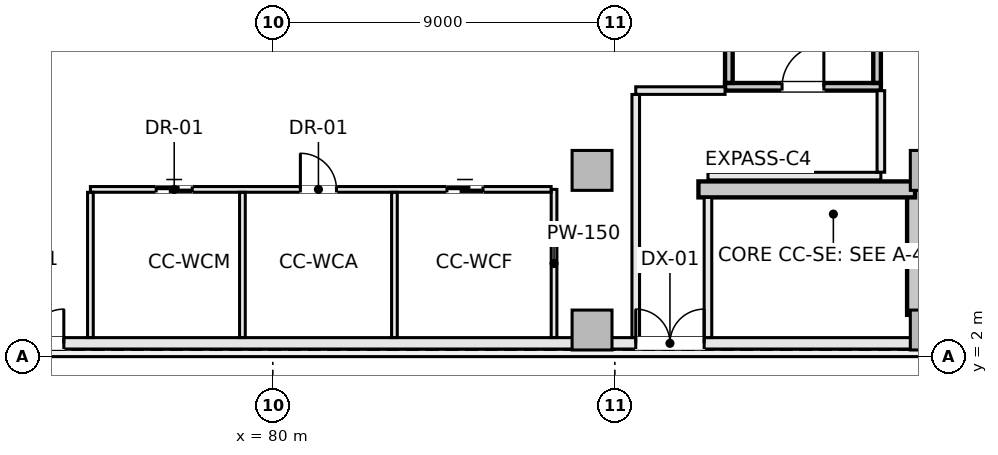
"""IFC4 building model, lengths in metres.
Left out: names, types, materials, properties, quantities, classifications, styles, units other than length and angle.
Written with IfcOpenShell. Run it as: python <this file> out.ifc"""

import sys

from ifc_helpers import new_model, si_unit, direction, frame, frame_2d, origin, origin_2d, place, context, subcontext, project, spatial, rectangle, extrude, element, fill, save


model = new_model("IFC4")
c1 = context("Model", 3, precision=1e-05, world=origin(), true_north=direction((0.0, 1.0)))
c2 = subcontext(c1, "Body", "Model", "MODEL_VIEW")
j1 = project(units=[si_unit("LENGTHUNIT", "METRE"), si_unit("PLANEANGLEUNIT", "RADIAN")], contexts=[c1])
p1 = place(None, origin())
s1 = spatial("IfcSite", under=j1, at=p1, CompositionType="ELEMENT")
p2 = place(p1, origin())
s2 = spatial("IfcBuilding", under=s1, at=p2, CompositionType="ELEMENT")
p3 = place(p2, origin())
s3 = spatial("IfcBuildingStorey", under=s2, at=p3, CompositionType="ELEMENT", Elevation=0.0)
p4 = place(p3, frame((96.9, 3.1, -0.36), z_axis=(0.0, 0.0, 1.0), x_axis=(0.0, 1.0, 0.0)))
e1 = element("IfcWall", 1, at=p4, inside=s3, PredefinedType="SHEAR", context=c2, shape_type="SweptSolid", body=[
    extrude(rectangle(XDim=3.3, YDim=0.42, at=frame_2d((1.65, 0.0))), origin(), (0.0, 0.0, 1.0), 5.1),
])
p5 = place(p3, frame((91.2, 6.4, -0.36), z_axis=(0.0, 0.0, 1.0), x_axis=(1.0, 0.0, 0.0)))
e2 = element("IfcWall", 2, at=p5, inside=s3, PredefinedType="SHEAR", context=c2, shape_type="SweptSolid", body=[
    extrude(rectangle(XDim=5.7, YDim=0.42, at=frame_2d((2.85, 0.0))), origin(), (0.0, 0.0, 1.0), 5.1),
])
for number, where, z_axis, x_axis in (
    (3, (88.4, 2.7, -0.36), (0.0, 0.0, 1.0), (1.0, 0.0, 0.0)),
    (4, (88.4, 6.9, -0.36), (0.0, 0.0, 1.0), (1.0, 0.0, 0.0)),
    (5, (97.3, 2.7, -0.36), (0.0, 0.0, 1.0), (1.0, 0.0, 0.0)),
    (6, (97.3, 6.9, -0.36), (0.0, 0.0, 1.0), (1.0, 0.0, 0.0)),
):
    element("IfcColumn", number, at=place(p3, frame(where, z_axis=z_axis, x_axis=x_axis)), inside=s3, PredefinedType="COLUMN", context=c2, shape_type="SweptSolid", body=[
        extrude(rectangle(XDim=1.05, YDim=1.05, at=origin_2d()), origin(), (0.0, 0.0, 1.0), 5.1),
    ])
p6 = place(p3, frame((62.35, 2.35, 0.0), z_axis=(0.0, 0.0, 1.0), x_axis=(1.0, 0.0, 0.0)))
e7 = element("IfcWall", 7, at=p6, inside=s3, PredefinedType="SOLIDWALL", context=c2, shape_type="SweptSolid", body=[
    extrude(rectangle(XDim=35.3, YDim=0.3, at=frame_2d((17.65, 0.0))), origin(), (0.0, 0.0, 1.0), 4.74),
])
p7 = place(p6, frame((6.25, 0.0, 0.0)))
e8 = element("IfcOpeningElement", 8, at=p7, cuts=e7, PredefinedType="OPENING", context=c2, shape_type="SweptSolid", body=[
    extrude(rectangle(XDim=1.8, YDim=2.3, at=frame_2d((0.9, 1.15))), frame((0.0, 0.16, 0.0), z_axis=(0.0, -1.0, 0.0), x_axis=(1.0, 0.0, 0.0)), (0.0, 0.0, 1.0), 0.32),
])
p8 = place(p6, frame((10.35, 0.0, 0.0)))
e9 = element("IfcOpeningElement", 9, at=p8, cuts=e7, PredefinedType="OPENING", context=c2, shape_type="SweptSolid", body=[
    extrude(rectangle(XDim=1.8, YDim=2.3, at=frame_2d((0.9, 1.15))), frame((0.0, 0.16, 0.0), z_axis=(0.0, -1.0, 0.0), x_axis=(1.0, 0.0, 0.0)), (0.0, 0.0, 1.0), 0.32),
])
p9 = place(p6, frame((27.2, 0.0, 0.0)))
e10 = element("IfcOpeningElement", 10, at=p9, cuts=e7, PredefinedType="OPENING", context=c2, shape_type="SweptSolid", body=[
    extrude(rectangle(XDim=1.8, YDim=2.3, at=frame_2d((0.9, 1.15))), frame((0.0, 0.16, 0.0), z_axis=(0.0, -1.0, 0.0), x_axis=(1.0, 0.0, 0.0)), (0.0, 0.0, 1.0), 0.32),
])
p10 = place(p3, frame((91.9, 9.1, -0.36), z_axis=(0.0, 0.0, 1.0), x_axis=(1.0, 0.0, 0.0)))
e11 = element("IfcWall", 11, at=p10, inside=s3, PredefinedType="SHEAR", context=c2, shape_type="SweptSolid", body=[
    extrude(rectangle(XDim=4.1, YDim=0.2, at=frame_2d((2.05, 0.0))), origin(), (0.0, 0.0, 1.0), 5.1),
])
p11 = place(p10, frame((1.5, 0.0, 0.36)))
e12 = element("IfcOpeningElement", 12, at=p11, cuts=e11, PredefinedType="OPENING", context=c2, shape_type="SweptSolid", body=[
    extrude(rectangle(XDim=1.1, YDim=2.15, at=frame_2d((0.55, 1.075))), frame((0.0, 0.11, 0.0), z_axis=(0.0, -1.0, 0.0), x_axis=(1.0, 0.0, 0.0)), (0.0, 0.0, 1.0), 0.22),
])
for number, where, z_axis, x_axis in (
    (13, (92.0, 9.202, -0.36), (0.0, 0.0, 1.0), (0.0, 1.0, 0.0)),
    (14, (95.9, 9.202, -0.36), (0.0, 0.0, 1.0), (0.0, 1.0, 0.0)),
):
    element("IfcWall", number, at=place(p3, frame(where, z_axis=z_axis, x_axis=x_axis)), inside=s3, PredefinedType="SHEAR", context=c2, shape_type="SweptSolid", body=[
        extrude(rectangle(XDim=9.596, YDim=0.2, at=frame_2d((4.798, 0.0))), origin(), (0.0, 0.0, 1.0), 5.1),
    ])
p12 = place(p3, frame((91.45, 6.75, 0.0), z_axis=(0.0, 0.0, 1.0), x_axis=(1.0, 0.0, 0.0)))
e15 = element("IfcWall", 15, at=p12, inside=s3, PredefinedType="SOLIDWALL", context=c2, shape_type="SweptSolid", body=[
    extrude(rectangle(XDim=4.55, YDim=0.2, at=frame_2d((2.275, 0.0))), origin(), (0.0, 0.0, 1.0), 4.188),
])
p13 = place(p3, frame((89.55, 9.0, 0.0), z_axis=(0.0, 0.0, 1.0), x_axis=(1.0, 0.0, 0.0)))
e16 = element("IfcWall", 16, at=p13, inside=s3, PredefinedType="SOLIDWALL", context=c2, shape_type="SweptSolid", body=[
    extrude(rectangle(XDim=2.35, YDim=0.2, at=frame_2d((1.175, 0.0))), origin(), (0.0, 0.0, 1.0), 4.74),
])
p14 = place(p3, frame((89.55, 2.502, 0.0), z_axis=(0.0, 0.0, 1.0), x_axis=(0.0, 1.0, 0.0)))
e17 = element("IfcWall", 17, at=p14, inside=s3, PredefinedType="SOLIDWALL", context=c2, shape_type="SweptSolid", body=[
    extrude(rectangle(XDim=6.396, YDim=0.2, at=frame_2d((3.198, 0.0))), origin(), (0.0, 0.0, 1.0), 4.74),
])
p15 = place(p3, frame((96.0, 6.852, 0.0), z_axis=(0.0, 0.0, 1.0), x_axis=(0.0, 1.0, 0.0)))
e18 = element("IfcWall", 18, at=p15, inside=s3, PredefinedType="SOLIDWALL", context=c2, shape_type="SweptSolid", body=[
    extrude(rectangle(XDim=2.146, YDim=0.2, at=frame_2d((1.073, 0.0))), origin(), (0.0, 0.0, 1.0), 4.74),
])
p16 = place(p3, frame((91.45, 2.502, 0.0), z_axis=(0.0, 0.0, 1.0), x_axis=(0.0, 1.0, 0.0)))
e19 = element("IfcWall", 19, at=p16, inside=s3, PredefinedType="SOLIDWALL", context=c2, shape_type="SweptSolid", body=[
    extrude(rectangle(XDim=3.686, YDim=0.2, at=frame_2d((1.843, 0.0))), origin(), (0.0, 0.0, 1.0), 4.74),
])
p17 = place(p3, frame((87.4, 2.502, 0.0), z_axis=(0.0, 0.0, 1.0), x_axis=(0.0, 1.0, 0.0)))
e20 = element("IfcWall", 20, at=p17, inside=s3, PredefinedType="PARTITIONING", context=c2, shape_type="SweptSolid", body=[
    extrude(rectangle(XDim=3.898, YDim=0.15, at=frame_2d((1.949, 0.0))), origin(), (0.0, 0.0, 1.0), 4.74),
])
p18 = place(p3, frame((75.2, 6.4, 0.0), z_axis=(0.0, 0.0, 1.0), x_axis=(1.0, 0.0, 0.0)))
e21 = element("IfcWall", 21, at=p18, inside=s3, PredefinedType="PARTITIONING", context=c2, shape_type="SweptSolid", body=[
    extrude(rectangle(XDim=12.123, YDim=0.15, at=frame_2d((6.062, 0.0))), origin(), (0.0, 0.0, 1.0), 4.74),
])
p19 = place(p18, frame((1.73, 0.0, 0.0)))
e22 = element("IfcOpeningElement", 22, at=p19, cuts=e21, PredefinedType="OPENING", context=c2, shape_type="SweptSolid", body=[
    extrude(rectangle(XDim=0.95, YDim=2.1, at=frame_2d((0.475, 1.05))), frame((0.0, 0.085, 0.0), z_axis=(0.0, -1.0, 0.0), x_axis=(1.0, 0.0, 0.0)), (0.0, 0.0, 1.0), 0.17),
])
p20 = place(p18, frame((5.525, 0.0, 0.0)))
e23 = element("IfcOpeningElement", 23, at=p20, cuts=e21, PredefinedType="OPENING", context=c2, shape_type="SweptSolid", body=[
    extrude(rectangle(XDim=0.95, YDim=2.1, at=frame_2d((0.475, 1.05))), frame((0.0, 0.085, 0.0), z_axis=(0.0, -1.0, 0.0), x_axis=(1.0, 0.0, 0.0)), (0.0, 0.0, 1.0), 0.17),
])
p21 = place(p18, frame((9.382, 0.0, 0.0)))
e24 = element("IfcOpeningElement", 24, at=p21, cuts=e21, PredefinedType="OPENING", context=c2, shape_type="SweptSolid", body=[
    extrude(rectangle(XDim=0.95, YDim=2.1, at=frame_2d((0.475, 1.05))), frame((0.0, 0.085, 0.0), z_axis=(0.0, -1.0, 0.0), x_axis=(1.0, 0.0, 0.0)), (0.0, 0.0, 1.0), 0.17),
])
for number, where, z_axis, x_axis in (
    (25, (75.2, 2.502, 0.0), (0.0, 0.0, 1.0), (0.0, 1.0, 0.0)),
    (26, (79.2, 2.502, 0.0), (0.0, 0.0, 1.0), (0.0, 1.0, 0.0)),
    (27, (83.2, 2.502, 0.0), (0.0, 0.0, 1.0), (0.0, 1.0, 0.0)),
):
    element("IfcWall", number, at=place(p3, frame(where, z_axis=z_axis, x_axis=x_axis)), inside=s3, PredefinedType="PARTITIONING", context=c2, shape_type="SweptSolid", body=[
        extrude(rectangle(XDim=3.821, YDim=0.15, at=frame_2d((1.911, 0.0))), origin(), (0.0, 0.0, 1.0), 4.74),
    ])
p22 = place(p8, frame((1.8, 0.0, 0.0), z_axis=(0.0, 0.0, 1.0), x_axis=(-1.0, 0.0, 0.0)))
e28 = element("IfcDoor", 28, at=p22, inside=s3, OperationType="DOUBLE_DOOR_SINGLE_SWING", PredefinedType="DOOR", context=c2, shape_type="SweptSolid", body=[
    extrude(rectangle(XDim=1.8, YDim=2.3, at=frame_2d((0.9, 1.15))), frame((0.0, 0.025, 0.0), z_axis=(0.0, -1.0, 0.0), x_axis=(1.0, 0.0, 0.0)), (0.0, 0.0, 1.0), 0.05),
])
fill(e9, e28)
p23 = place(p9, frame((1.8, 0.0, 0.0), z_axis=(0.0, 0.0, 1.0), x_axis=(-1.0, 0.0, 0.0)))
e29 = element("IfcDoor", 29, at=p23, inside=s3, OperationType="DOUBLE_DOOR_SINGLE_SWING", PredefinedType="DOOR", context=c2, shape_type="SweptSolid", body=[
    extrude(rectangle(XDim=1.8, YDim=2.3, at=frame_2d((0.9, 1.15))), frame((0.0, 0.025, 0.0), z_axis=(0.0, -1.0, 0.0), x_axis=(1.0, 0.0, 0.0)), (0.0, 0.0, 1.0), 0.05),
])
fill(e10, e29)
p24 = place(p11, origin())
e30 = element("IfcDoor", 30, at=p24, inside=s3, OperationType="SINGLE_SWING_RIGHT", PredefinedType="DOOR", context=c2, shape_type="SweptSolid", body=[
    extrude(rectangle(XDim=1.1, YDim=2.15, at=frame_2d((0.55, 1.075))), frame((0.0, 0.025, 0.0), z_axis=(0.0, -1.0, 0.0), x_axis=(1.0, 0.0, 0.0)), (0.0, 0.0, 1.0), 0.05),
])
fill(e12, e30)
p25 = place(p19, origin())
e31 = element("IfcDoor", 31, at=p25, inside=s3, OperationType="SINGLE_SWING_RIGHT", PredefinedType="DOOR", context=c2, shape_type="SweptSolid", body=[
    extrude(rectangle(XDim=0.95, YDim=2.1, at=frame_2d((0.475, 1.05))), frame((0.0, 0.025, 0.0), z_axis=(0.0, -1.0, 0.0), x_axis=(1.0, 0.0, 0.0)), (0.0, 0.0, 1.0), 0.05),
])
fill(e22, e31)
p26 = place(p20, origin())
e32 = element("IfcDoor", 32, at=p26, inside=s3, OperationType="SINGLE_SWING_LEFT", PredefinedType="DOOR", context=c2, shape_type="SweptSolid", body=[
    extrude(rectangle(XDim=0.95, YDim=2.1, at=frame_2d((0.475, 1.05))), frame((0.0, 0.025, 0.0), z_axis=(0.0, -1.0, 0.0), x_axis=(1.0, 0.0, 0.0)), (0.0, 0.0, 1.0), 0.05),
])
fill(e23, e32)
p27 = place(p21, origin())
e33 = element("IfcDoor", 33, at=p27, inside=s3, OperationType="SINGLE_SWING_RIGHT", PredefinedType="DOOR", context=c2, shape_type="SweptSolid", body=[
    extrude(rectangle(XDim=0.95, YDim=2.1, at=frame_2d((0.475, 1.05))), frame((0.0, 0.025, 0.0), z_axis=(0.0, -1.0, 0.0), x_axis=(1.0, 0.0, 0.0)), (0.0, 0.0, 1.0), 0.05),
])
fill(e24, e33)
save(model, sys.argv[1])
